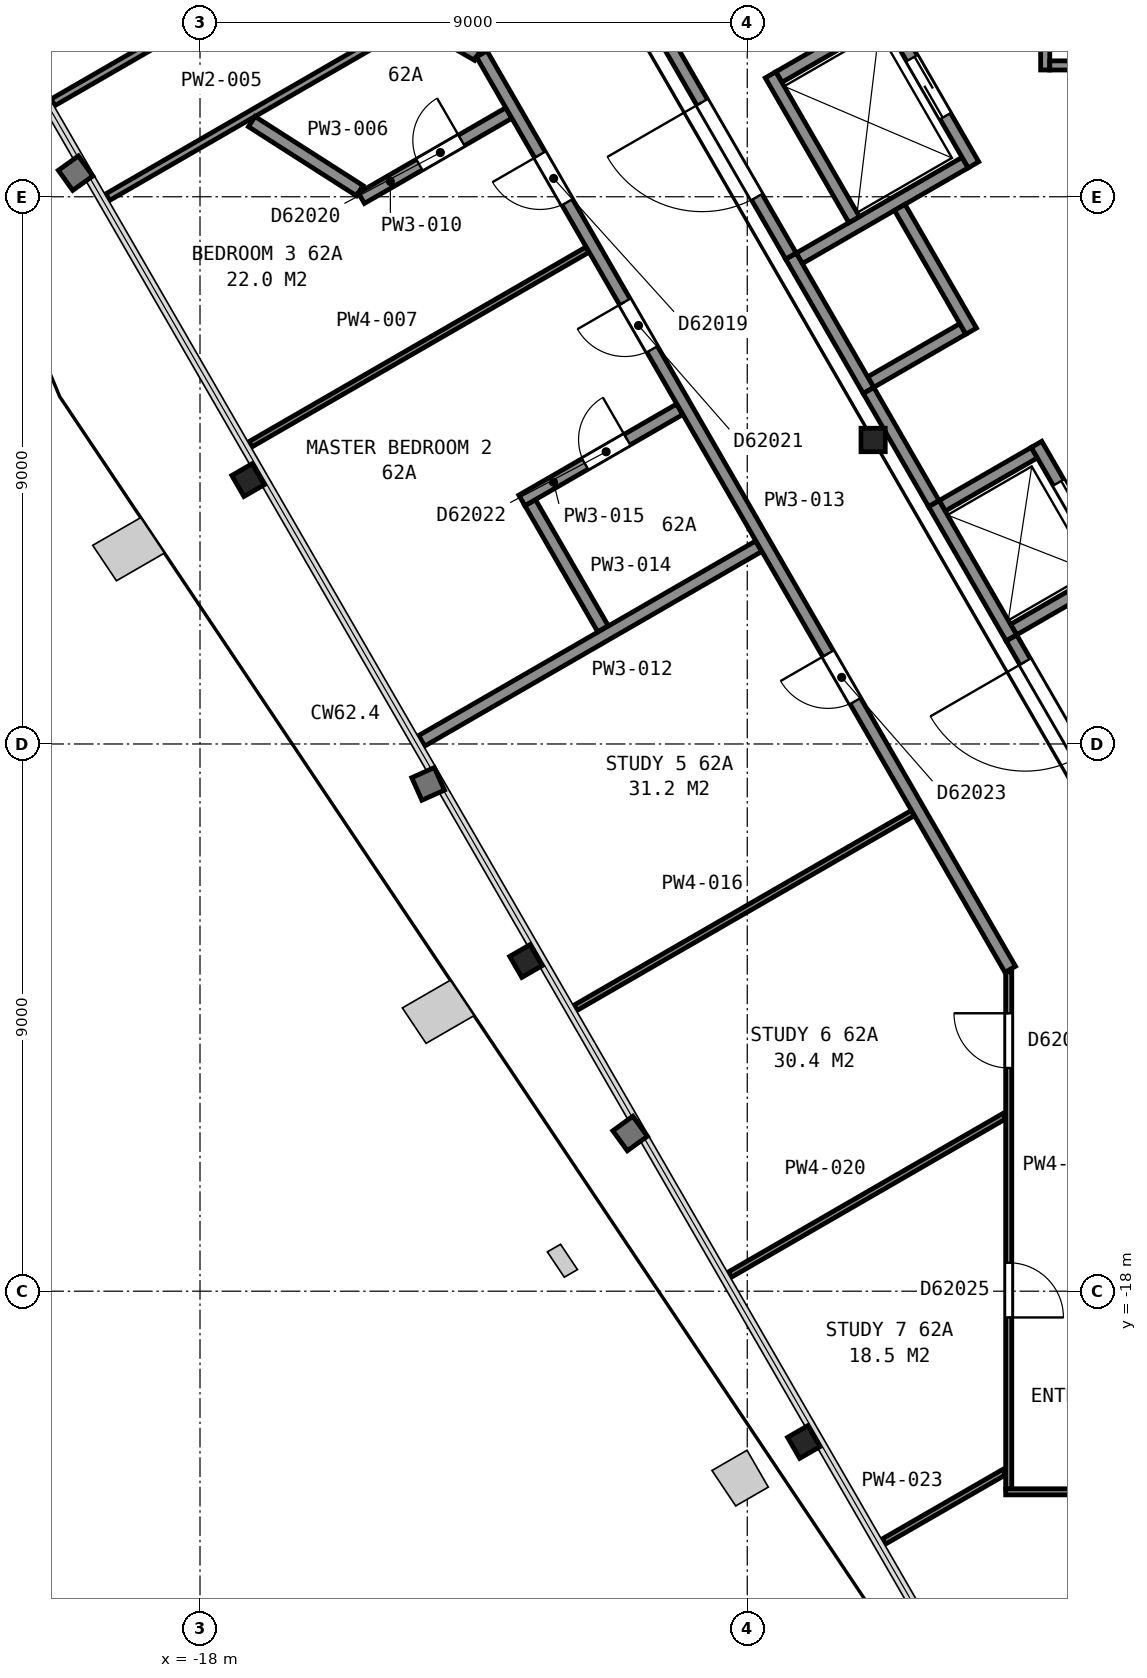
"""IFC4 building model, lengths in metres.
Left out: names, types, materials, properties, quantities, classifications, styles, units other than length and angle.
Written with IfcOpenShell. Run it as: python <this file> out.ifc"""

import sys

from ifc_helpers import new_model, si_unit, direction, frame, frame_2d, origin, origin_2d, place, context, subcontext, project, spatial, rectangle, i_section, extrude, element, fill, save


model = new_model("IFC4")
c1 = context("Model", 3, precision=1e-05, world=origin(), true_north=direction((0.0, 1.0)))
c2 = subcontext(c1, "Body", "Model", "MODEL_VIEW")
j1 = project(units=[si_unit("LENGTHUNIT", "METRE"), si_unit("PLANEANGLEUNIT", "RADIAN")], contexts=[c1])
p1 = place(None, origin())
s1 = spatial("IfcSite", under=j1, at=p1, CompositionType="ELEMENT")
p2 = place(p1, origin())
s2 = spatial("IfcBuilding", under=s1, at=p2, CompositionType="ELEMENT")
p3 = place(p2, frame((0.0, 0.0, 247.1)))
s3 = spatial("IfcBuildingStorey", under=s2, at=p3, CompositionType="ELEMENT", Elevation=247.1)
for number, where, z_axis, x_axis in (
    (1, (-17.21, -4.66, 0.035), (0.0, 0.0, 1.0), (-0.5, 0.866, 0.0)),
    (2, (-12.64, -12.57, 0.035), (0.0, 0.0, 1.0), (-0.5, 0.866, 0.0)),
    (3, (-8.07, -20.48, 0.035), (0.0, 0.0, 1.0), (-0.5, 0.866, 0.0)),
):
    element("IfcColumn", number, at=place(p3, frame(where, z_axis=z_axis, x_axis=x_axis)), inside=s3, PredefinedType="COLUMN", context=c2, shape_type="SweptSolid", body=[
        extrude(i_section(OverallWidth=0.399, OverallDepth=0.386, WebThickness=0.021, FlangeThickness=0.033, FilletRadius=0.015, at=origin_2d()), origin(), (0.0, 0.0, 1.0), 3.665),
    ])
p4 = place(p3, frame((-6.93, -4.0, 0.0), z_axis=(0.0, 0.0, 1.0), x_axis=(1.0, 0.0, 0.0)))
e4 = element("IfcColumn", 4, at=p4, inside=s3, PredefinedType="COLUMN", context=c2, shape_type="SweptSolid", body=[
    extrude(i_section(OverallWidth=0.399, OverallDepth=0.386, WebThickness=0.021, FlangeThickness=0.033, FilletRadius=0.015, at=origin_2d()), origin(), (0.0, 0.0, 1.0), 3.7),
])
for number, where, z_axis, x_axis in (
    (5, (-4.62, -7.118, 0.0), (0.0, 0.0, 1.0), (0.866, 0.5, 0.0)),
    (6, (-5.795, -5.083, 0.0), (0.0, 0.0, 1.0), (0.866, 0.5, 0.0)),
    (7, (-6.97, -3.048, 0.0), (0.0, 0.0, 1.0), (0.866, 0.5, 0.0)),
):
    element("IfcWall", number, at=place(p3, frame(where, z_axis=z_axis, x_axis=x_axis)), inside=s3, PredefinedType="PARTITIONING", context=c2, shape_type="SweptSolid", body=[
        extrude(rectangle(XDim=1.75, YDim=0.2, at=frame_2d((0.875, 0.0))), origin(), (0.0, 0.0, 1.0), 3.7),
    ])
p5 = place(p3, frame((-8.145, -1.013, 0.0), z_axis=(0.0, 0.0, 1.0), x_axis=(0.866016494683, 0.500015430699, 0.0)))
e8 = element("IfcWall", 8, at=p5, inside=s3, PredefinedType="PARTITIONING", context=c2, shape_type="SweptSolid", body=[
    extrude(rectangle(XDim=3.15, YDim=0.2, at=frame_2d((1.575, 0.0))), origin(), (0.0, 0.0, 1.0), 3.7),
])
p6 = place(p3, frame((-8.48, 1.969, 0.0), z_axis=(0.0, 0.0, 1.0), x_axis=(0.866000020948, 0.500043961785, 0.0)))
e9 = element("IfcWall", 9, at=p6, inside=s3, PredefinedType="PARTITIONING", context=c2, shape_type="SweptSolid", body=[
    extrude(rectangle(XDim=1.95, YDim=0.2, at=frame_2d((0.975, 0.0))), origin(), (0.0, 0.0, 1.0), 3.7),
])
p7 = place(p3, frame((-5.28, 0.525, 0.0), z_axis=(0.0, 0.0, 1.0), x_axis=(-0.500037662692, 0.866003658127, 0.0)))
e10 = element("IfcWall", 10, at=p7, inside=s3, PredefinedType="PARTITIONING", context=c2, shape_type="SweptSolid", body=[
    extrude(rectangle(XDim=2.95, YDim=0.2, at=frame_2d((1.475, 0.0))), origin(), (0.0, 0.0, 1.0), 3.7),
])
p8 = place(p7, frame((0.925, 0.0, 0.0)))
e11 = element("IfcOpeningElement", 11, at=p8, cuts=e10, PredefinedType="OPENING", context=c2, shape_type="SweptSolid", body=[
    extrude(rectangle(XDim=1.1, YDim=2.1, at=frame_2d((0.55, 1.05))), frame((0.0, 0.11, 0.0), z_axis=(0.0, -1.0, 0.0), x_axis=(1.0, 0.0, 0.0)), (0.0, 0.0, 1.0), 0.22),
])
p9 = place(p3, frame((-2.968, -6.28, 0.0), z_axis=(0.0, 0.0, 1.0), x_axis=(-0.499990435942, 0.866030925526, 0.0)))
e12 = element("IfcWall", 12, at=p9, inside=s3, PredefinedType="PARTITIONING", context=c2, shape_type="SweptSolid", body=[
    extrude(rectangle(XDim=2.55, YDim=0.2, at=frame_2d((1.275, 0.0))), origin(), (0.0, 0.0, 1.0), 3.7),
])
p10 = place(p9, frame((0.725, 0.0, 0.0)))
e13 = element("IfcOpeningElement", 13, at=p10, cuts=e12, PredefinedType="OPENING", context=c2, shape_type="SweptSolid", body=[
    extrude(rectangle(XDim=1.1, YDim=2.1, at=frame_2d((0.55, 1.05))), frame((0.0, 0.11, 0.0), z_axis=(0.0, -1.0, 0.0), x_axis=(1.0, 0.0, 0.0)), (0.0, 0.0, 1.0), 0.22),
])
p11 = place(p3, frame((-5.318, -2.21, 0.0), z_axis=(0.0, 0.0, 1.0), x_axis=(-0.499938297808, 0.866061024631, 0.0)))
e14 = element("IfcWall", 14, at=p11, inside=s3, PredefinedType="PARTITIONING", context=c2, shape_type="SweptSolid", body=[
    extrude(rectangle(XDim=2.35, YDim=0.2, at=frame_2d((1.175, 0.0))), origin(), (0.0, 0.0, 1.0), 3.7),
])
p12 = place(p3, frame((-7.242, -0.376, 0.0), z_axis=(0.0, 0.0, 1.0), x_axis=(-0.499996545922, 0.866027397988, 0.0)))
e15 = element("IfcWall", 15, at=p12, inside=s3, PredefinedType="PARTITIONING", context=c2, shape_type="SweptSolid", body=[
    extrude(rectangle(XDim=2.75, YDim=0.2, at=frame_2d((1.375, 0.0))), origin(), (0.0, 0.0, 1.0), 3.7),
])
for number, where, z_axis, x_axis in (
    (16, (-4.656, -7.255, 0.0), (0.0, 0.0, 1.0), (-0.5, 0.866, 0.0)),
    (17, (-7.006, -3.185, 0.0), (0.0, 0.0, 1.0), (-0.5, 0.866, 0.0)),
):
    element("IfcWall", number, at=place(p3, frame(where, z_axis=z_axis, x_axis=x_axis)), inside=s3, PredefinedType="PARTITIONING", context=c2, shape_type="SweptSolid", body=[
        extrude(rectangle(XDim=2.55, YDim=0.2, at=frame_2d((1.275, 0.0))), origin(), (0.0, 0.0, 1.0), 3.7),
    ])
p13 = place(p3, frame((-11.591, 4.755, 0.0), z_axis=(0.0, 0.0, 1.0), x_axis=(0.500043977787, -0.866000011708, 0.0)))
e18 = element("IfcWall", 18, at=p13, inside=s3, PredefinedType="PARTITIONING", context=c2, shape_type="SweptSolid", body=[
    extrude(rectangle(XDim=6.617, YDim=0.2, at=frame_2d((3.308, 0.0))), origin(), (0.0, 0.0, 1.0), 3.45),
])
p14 = place(p13, frame((3.695, 0.0, 0.0)))
e19 = element("IfcOpeningElement", 19, at=p14, cuts=e18, PredefinedType="OPENING", context=c2, shape_type="SweptSolid", body=[
    extrude(rectangle(XDim=1.8, YDim=2.1, at=frame_2d((0.9, 1.05))), frame((0.0, 0.11, 0.0), z_axis=(0.0, -1.0, 0.0), x_axis=(1.0, 0.0, 0.0)), (0.0, 0.0, 1.0), 0.22),
])
p15 = place(p3, frame((-7.005, -3.187, 0.0), z_axis=(0.0, 0.0, 1.0), x_axis=(0.499689606989, -0.866204535123, 0.0)))
e20 = element("IfcWall", 20, at=p15, inside=s3, PredefinedType="PARTITIONING", context=c2, shape_type="SweptSolid", body=[
    extrude(rectangle(XDim=2.145, YDim=0.2, at=frame_2d((1.072, 0.0))), origin(), (0.0, 0.0, 1.0), 3.45),
])
p16 = place(p3, frame((-4.655, -7.257, 0.0), z_axis=(0.0, 0.0, 1.0), x_axis=(0.499966124405, -0.866044960985, 0.0)))
e21 = element("IfcWall", 21, at=p16, inside=s3, PredefinedType="PARTITIONING", context=c2, shape_type="SweptSolid", body=[
    extrude(rectangle(XDim=5.956, YDim=0.2, at=frame_2d((2.978, 0.0))), origin(), (0.0, 0.0, 1.0), 3.45),
])
p17 = place(p16, frame((0.45, 0.0, 0.0)))
e22 = element("IfcOpeningElement", 22, at=p17, cuts=e21, PredefinedType="OPENING", context=c2, shape_type="SweptSolid", body=[
    extrude(rectangle(XDim=1.8, YDim=2.1, at=frame_2d((0.9, 1.05))), frame((0.0, 0.11, 0.0), z_axis=(0.0, -1.0, 0.0), x_axis=(1.0, 0.0, 0.0)), (0.0, 0.0, 1.0), 0.22),
])
p18 = place(p3, frame((-4.1, 2.085, 0.0), z_axis=(0.0, 0.0, 1.0), x_axis=(0.0, 1.0, 0.0)))
e23 = element("IfcWall", 23, at=p18, inside=s3, PredefinedType="PARTITIONING", context=c2, shape_type="SweptSolid", body=[
    extrude(rectangle(XDim=3.523, YDim=0.15, at=frame_2d((1.761, 0.0))), origin(), (0.0, 0.0, 1.0), 3.45),
])
p19 = place(p3, frame((-4.025, 2.16, 0.0), z_axis=(0.0, 0.0, 1.0), x_axis=(1.0, 0.0, 0.0)))
e24 = element("IfcWall", 24, at=p19, inside=s3, PredefinedType="PARTITIONING", context=c2, shape_type="SweptSolid", body=[
    extrude(rectangle(XDim=1.238, YDim=0.15, at=frame_2d((0.619, 0.0))), origin(), (0.0, 0.0, 1.0), 3.45),
])
p20 = place(p3, frame((-20.418, 1.553, 0.0), z_axis=(0.0, 0.0, 1.0), x_axis=(0.8660976733, 0.49987480463, 0.0)))
e25 = element("IfcWall", 25, at=p20, inside=s3, PredefinedType="PARTITIONING", context=c2, shape_type="SweptSolid", body=[
    extrude(rectangle(XDim=4.717, YDim=0.125, at=frame_2d((2.358, 0.0))), origin(), (0.0, 0.0, 1.0), 2.713),
])
p21 = place(p3, frame((-19.518, -0.006, 0.0), z_axis=(0.0, 0.0, 1.0), x_axis=(0.866072118736, 0.499919078599, 0.0)))
e26 = element("IfcWall", 26, at=p21, inside=s3, PredefinedType="PARTITIONING", context=c2, shape_type="SweptSolid", body=[
    extrude(rectangle(XDim=5.912, YDim=0.125, at=frame_2d((2.956, 0.0))), origin(), (0.0, 0.0, 1.0), 2.713),
])
p22 = place(p3, frame((-17.149, 1.236, 0.0), z_axis=(0.0, 0.0, 1.0), x_axis=(0.842376529327, -0.538889397593, 0.0)))
e27 = element("IfcWall", 27, at=p22, inside=s3, PredefinedType="PARTITIONING", context=c2, shape_type="SweptSolid", body=[
    extrude(rectangle(XDim=2.108, YDim=0.2, at=frame_2d((1.054, 0.0))), origin(), (0.0, 0.0, 1.0), 2.713),
])
p23 = place(p3, frame((-17.171, -4.071, 0.0), z_axis=(0.0, 0.0, 1.0), x_axis=(0.865973383125, 0.500090091603, 0.0)))
e28 = element("IfcWall", 28, at=p23, inside=s3, PredefinedType="PARTITIONING", context=c2, shape_type="SweptSolid", body=[
    extrude(rectangle(XDim=6.4, YDim=0.1, at=frame_2d((3.2, 0.0))), origin(), (0.0, 0.0, 1.0), 2.713),
])
p24 = place(p3, frame((-15.346, -0.023, 0.0), z_axis=(0.0, 0.0, 1.0), x_axis=(0.865969158485, 0.500097407065, 0.0)))
e29 = element("IfcWall", 29, at=p24, inside=s3, PredefinedType="PARTITIONING", context=c2, shape_type="SweptSolid", body=[
    extrude(rectangle(XDim=2.799, YDim=0.2, at=frame_2d((1.4, 0.0))), origin(), (0.0, 0.0, 1.0), 2.713),
])
p25 = place(p24, frame((1.1, 0.0, 0.0)))
e30 = element("IfcOpeningElement", 30, at=p25, cuts=e29, PredefinedType="OPENING", context=c2, shape_type="SweptSolid", body=[
    extrude(rectangle(XDim=0.8, YDim=2.1, at=frame_2d((0.4, 1.05))), frame((0.0, 0.11, 0.0), z_axis=(0.0, -1.0, 0.0), x_axis=(1.0, 0.0, 0.0)), (0.0, 0.0, 1.0), 0.22),
])
p26 = place(p3, frame((-14.381, 2.877, 0.0), z_axis=(0.0, 0.0, 1.0), x_axis=(0.866215333661, -0.499670887416, 0.0)))
e31 = element("IfcWall", 31, at=p26, inside=s3, PredefinedType="PARTITIONING", context=c2, shape_type="SweptSolid", body=[
    extrude(rectangle(XDim=1.093, YDim=0.2, at=frame_2d((0.546, 0.0))), origin(), (0.0, 0.0, 1.0), 2.713),
])
p27 = place(p3, frame((-14.355, -8.948, 0.0), z_axis=(0.0, 0.0, 1.0), x_axis=(0.866039463868, 0.499975646431, 0.0)))
e32 = element("IfcWall", 32, at=p27, inside=s3, PredefinedType="PARTITIONING", context=c2, shape_type="SweptSolid", body=[
    extrude(rectangle(XDim=6.399, YDim=0.2, at=frame_2d((3.2, 0.0))), origin(), (0.0, 0.0, 1.0), 2.713),
])
p28 = place(p3, frame((-4.675, -12.706, 0.0), z_axis=(0.0, 0.0, 1.0), x_axis=(-0.499972470324, 0.866041297467, 0.0)))
e33 = element("IfcWall", 33, at=p28, inside=s3, PredefinedType="PARTITIONING", context=c2, shape_type="SweptSolid", body=[
    extrude(rectangle(XDim=17.385, YDim=0.2, at=frame_2d((8.692, 0.0))), origin(), (0.0, 0.0, 1.0), 2.713),
])
p29 = place(p28, frame((14.57, 0.0, 0.0)))
e34 = element("IfcOpeningElement", 34, at=p29, cuts=e33, PredefinedType="OPENING", context=c2, shape_type="SweptSolid", body=[
    extrude(rectangle(XDim=0.9, YDim=2.1, at=frame_2d((0.45, 1.05))), frame((0.0, 0.11, 0.0), z_axis=(0.0, -1.0, 0.0), x_axis=(1.0, 0.0, 0.0)), (0.0, 0.0, 1.0), 0.22),
])
p30 = place(p28, frame((11.777, 0.0, 0.0)))
e35 = element("IfcOpeningElement", 35, at=p30, cuts=e33, PredefinedType="OPENING", context=c2, shape_type="SweptSolid", body=[
    extrude(rectangle(XDim=0.9, YDim=2.1, at=frame_2d((0.45, 1.05))), frame((0.0, 0.11, 0.0), z_axis=(0.0, -1.0, 0.0), x_axis=(1.0, 0.0, 0.0)), (0.0, 0.0, 1.0), 0.22),
])
p31 = place(p28, frame((5.095, 0.0, 0.0)))
e36 = element("IfcOpeningElement", 36, at=p31, cuts=e33, PredefinedType="OPENING", context=c2, shape_type="SweptSolid", body=[
    extrude(rectangle(XDim=0.9, YDim=2.1, at=frame_2d((0.45, 1.05))), frame((0.0, 0.11, 0.0), z_axis=(0.0, -1.0, 0.0), x_axis=(1.0, 0.0, 0.0)), (0.0, 0.0, 1.0), 0.22),
])
p32 = place(p3, frame((-12.57, -5.031, 0.0), z_axis=(0.0, 0.0, 1.0), x_axis=(0.499943030081, -0.866058292884, 0.0)))
e37 = element("IfcWall", 37, at=p32, inside=s3, PredefinedType="PARTITIONING", context=c2, shape_type="SweptSolid", body=[
    extrude(rectangle(XDim=2.395, YDim=0.2, at=frame_2d((1.198, 0.0))), origin(), (0.0, 0.0, 1.0), 2.713),
])
p33 = place(p3, frame((-10.113, -3.497, 0.0), z_axis=(0.0, 0.0, 1.0), x_axis=(-0.866032178313, -0.499988265988, 0.0)))
e38 = element("IfcWall", 38, at=p33, inside=s3, PredefinedType="PARTITIONING", context=c2, shape_type="SweptSolid", body=[
    extrude(rectangle(XDim=2.995, YDim=0.2, at=frame_2d((1.497, 0.0))), origin(), (0.0, 0.0, 1.0), 2.713),
])
p34 = place(p33, frame((0.995, 0.0, 0.0)))
e39 = element("IfcOpeningElement", 39, at=p34, cuts=e38, PredefinedType="OPENING", context=c2, shape_type="SweptSolid", body=[
    extrude(rectangle(XDim=0.8, YDim=2.1, at=frame_2d((0.4, 1.05))), frame((0.0, 0.11, 0.0), z_axis=(0.0, -1.0, 0.0), x_axis=(1.0, 0.0, 0.0)), (0.0, 0.0, 1.0), 0.22),
])
p35 = place(p3, frame((-11.821, -13.337, 0.0), z_axis=(0.0, 0.0, 1.0), x_axis=(0.866013405822, 0.500020780506, 0.0)))
e40 = element("IfcWall", 40, at=p35, inside=s3, PredefinedType="PARTITIONING", context=c2, shape_type="SweptSolid", body=[
    extrude(rectangle(XDim=6.399, YDim=0.1, at=frame_2d((3.2, 0.0))), origin(), (0.0, 0.0, 1.0), 2.713),
])
p36 = place(p3, frame((-9.286, -17.727, 0.0), z_axis=(0.0, 0.0, 1.0), x_axis=(0.865990461678, 0.50006051662, 0.0)))
e41 = element("IfcWall", 41, at=p36, inside=s3, PredefinedType="PARTITIONING", context=c2, shape_type="SweptSolid", body=[
    extrude(rectangle(XDim=5.209, YDim=0.1, at=frame_2d((2.604, 0.0))), origin(), (0.0, 0.0, 1.0), 2.713),
])
p37 = place(p3, frame((-6.752, -22.116, 0.0), z_axis=(0.0, 0.0, 1.0), x_axis=(0.866135723987, 0.499808871103, 0.0)))
e42 = element("IfcWall", 42, at=p37, inside=s3, PredefinedType="PARTITIONING", context=c2, shape_type="SweptSolid", body=[
    extrude(rectangle(XDim=2.283, YDim=0.1, at=frame_2d((1.141, 0.0))), origin(), (0.0, 0.0, 1.0), 2.713),
])
p38 = place(p3, frame((-4.7, -21.25, 0.0), z_axis=(0.0, 0.0, 1.0), x_axis=(0.0, 1.0, 0.0)))
e43 = element("IfcWall", 43, at=p38, inside=s3, PredefinedType="PARTITIONING", context=c2, shape_type="SweptSolid", body=[
    extrude(rectangle(XDim=8.502, YDim=0.1, at=frame_2d((4.251, 0.0))), origin(), (0.0, 0.0, 1.0), 2.713),
])
p39 = place(p38, frame((6.921, 0.0, 0.0)))
e44 = element("IfcOpeningElement", 44, at=p39, cuts=e43, PredefinedType="OPENING", context=c2, shape_type="SweptSolid", body=[
    extrude(rectangle(XDim=0.9, YDim=2.1, at=frame_2d((0.45, 1.05))), frame((0.0, 0.06, 0.0), z_axis=(0.0, -1.0, 0.0), x_axis=(1.0, 0.0, 0.0)), (0.0, 0.0, 1.0), 0.12),
])
p40 = place(p38, frame((2.818, 0.0, 0.0)))
e45 = element("IfcOpeningElement", 45, at=p40, cuts=e43, PredefinedType="OPENING", context=c2, shape_type="SweptSolid", body=[
    extrude(rectangle(XDim=0.9, YDim=2.1, at=frame_2d((0.45, 1.05))), frame((0.0, 0.06, 0.0), z_axis=(0.0, -1.0, 0.0), x_axis=(1.0, 0.0, 0.0)), (0.0, 0.0, 1.0), 0.12),
])
p41 = place(p3, frame((4.7, -21.3, 0.0), z_axis=(0.0, 0.0, 1.0), x_axis=(-1.0, 0.0, 0.0)))
e46 = element("IfcWall", 46, at=p41, inside=s3, PredefinedType="PARTITIONING", context=c2, shape_type="SweptSolid", body=[
    extrude(rectangle(XDim=9.45, YDim=0.1, at=frame_2d((4.725, 0.0))), origin(), (0.0, 0.0, 1.0), 2.713),
])
p42 = place(p41, frame((4.1, 0.0, 0.0)))
e47 = element("IfcOpeningElement", 47, at=p42, cuts=e46, PredefinedType="OPENING", context=c2, shape_type="SweptSolid", body=[
    extrude(rectangle(XDim=1.2, YDim=2.1, at=frame_2d((0.6, 1.05))), frame((0.0, 0.06, 0.0), z_axis=(0.0, -1.0, 0.0), x_axis=(1.0, 0.0, 0.0)), (0.0, 0.0, 1.0), 0.12),
])
p43 = place(p10, origin())
e48 = element("IfcDoor", 48, at=p43, inside=s3, OperationType="SLIDING_TO_RIGHT", PredefinedType="DOOR", context=c2, shape_type="SweptSolid", body=[
    extrude(rectangle(XDim=1.1, YDim=2.1, at=frame_2d((0.55, 1.05))), frame((0.0, 0.025, 0.0), z_axis=(0.0, -1.0, 0.0), x_axis=(1.0, 0.0, 0.0)), (0.0, 0.0, 1.0), 0.05),
])
fill(e13, e48)
p44 = place(p8, origin())
e49 = element("IfcDoor", 49, at=p44, inside=s3, OperationType="SLIDING_TO_LEFT", PredefinedType="DOOR", context=c2, shape_type="SweptSolid", body=[
    extrude(rectangle(XDim=1.1, YDim=2.1, at=frame_2d((0.55, 1.05))), frame((0.0, 0.025, 0.0), z_axis=(0.0, -1.0, 0.0), x_axis=(1.0, 0.0, 0.0)), (0.0, 0.0, 1.0), 0.05),
])
fill(e11, e49)
p45 = place(p14, origin())
e50 = element("IfcDoor", 50, at=p45, inside=s3, OperationType="DOUBLE_DOOR_SINGLE_SWING", PredefinedType="DOOR", context=c2, shape_type="SweptSolid", body=[
    extrude(rectangle(XDim=1.8, YDim=2.1, at=frame_2d((0.9, 1.05))), frame((0.0, 0.025, 0.0), z_axis=(0.0, -1.0, 0.0), x_axis=(1.0, 0.0, 0.0)), (0.0, 0.0, 1.0), 0.05),
])
fill(e19, e50)
p46 = place(p17, origin())
e51 = element("IfcDoor", 51, at=p46, inside=s3, OperationType="DOUBLE_DOOR_SINGLE_SWING", PredefinedType="DOOR", context=c2, shape_type="SweptSolid", body=[
    extrude(rectangle(XDim=1.8, YDim=2.1, at=frame_2d((0.9, 1.05))), frame((0.0, 0.025, 0.0), z_axis=(0.0, -1.0, 0.0), x_axis=(1.0, 0.0, 0.0)), (0.0, 0.0, 1.0), 0.05),
])
fill(e22, e51)
p47 = place(p25, origin())
e52 = element("IfcDoor", 52, at=p47, inside=s3, OperationType="SINGLE_SWING_RIGHT", PredefinedType="DOOR", context=c2, shape_type="SweptSolid", body=[
    extrude(rectangle(XDim=0.8, YDim=2.1, at=frame_2d((0.4, 1.05))), frame((0.0, 0.025, 0.0), z_axis=(0.0, -1.0, 0.0), x_axis=(1.0, 0.0, 0.0)), (0.0, 0.0, 1.0), 0.05),
])
fill(e30, e52)
p48 = place(p29, origin())
e53 = element("IfcDoor", 53, at=p48, inside=s3, OperationType="SINGLE_SWING_RIGHT", PredefinedType="DOOR", context=c2, shape_type="SweptSolid", body=[
    extrude(rectangle(XDim=0.9, YDim=2.1, at=frame_2d((0.45, 1.05))), frame((0.0, 0.025, 0.0), z_axis=(0.0, -1.0, 0.0), x_axis=(1.0, 0.0, 0.0)), (0.0, 0.0, 1.0), 0.05),
])
fill(e34, e53)
p49 = place(p30, origin())
e54 = element("IfcDoor", 54, at=p49, inside=s3, OperationType="SINGLE_SWING_RIGHT", PredefinedType="DOOR", context=c2, shape_type="SweptSolid", body=[
    extrude(rectangle(XDim=0.9, YDim=2.1, at=frame_2d((0.45, 1.05))), frame((0.0, 0.025, 0.0), z_axis=(0.0, -1.0, 0.0), x_axis=(1.0, 0.0, 0.0)), (0.0, 0.0, 1.0), 0.05),
])
fill(e35, e54)
p50 = place(p31, origin())
e55 = element("IfcDoor", 55, at=p50, inside=s3, OperationType="SINGLE_SWING_RIGHT", PredefinedType="DOOR", context=c2, shape_type="SweptSolid", body=[
    extrude(rectangle(XDim=0.9, YDim=2.1, at=frame_2d((0.45, 1.05))), frame((0.0, 0.025, 0.0), z_axis=(0.0, -1.0, 0.0), x_axis=(1.0, 0.0, 0.0)), (0.0, 0.0, 1.0), 0.05),
])
fill(e36, e55)
p51 = place(p34, origin())
e56 = element("IfcDoor", 56, at=p51, inside=s3, OperationType="SINGLE_SWING_LEFT", PredefinedType="DOOR", context=c2, shape_type="SweptSolid", body=[
    extrude(rectangle(XDim=0.8, YDim=2.1, at=frame_2d((0.4, 1.05))), frame((0.0, 0.025, 0.0), z_axis=(0.0, -1.0, 0.0), x_axis=(1.0, 0.0, 0.0)), (0.0, 0.0, 1.0), 0.05),
])
fill(e39, e56)
p52 = place(p39, origin())
e57 = element("IfcDoor", 57, at=p52, inside=s3, OperationType="SINGLE_SWING_RIGHT", PredefinedType="DOOR", context=c2, shape_type="SweptSolid", body=[
    extrude(rectangle(XDim=0.9, YDim=2.1, at=frame_2d((0.45, 1.05))), frame((0.0, 0.025, 0.0), z_axis=(0.0, -1.0, 0.0), x_axis=(1.0, 0.0, 0.0)), (0.0, 0.0, 1.0), 0.05),
])
fill(e44, e57)
p53 = place(p40, origin())
e58 = element("IfcDoor", 58, at=p53, inside=s3, OperationType="SINGLE_SWING_LEFT", PredefinedType="DOOR", context=c2, shape_type="SweptSolid", body=[
    extrude(rectangle(XDim=0.9, YDim=2.1, at=frame_2d((0.45, 1.05))), frame((0.0, 0.025, 0.0), z_axis=(0.0, -1.0, 0.0), x_axis=(1.0, 0.0, 0.0)), (0.0, 0.0, 1.0), 0.05),
])
fill(e45, e58)
save(model, sys.argv[1])
